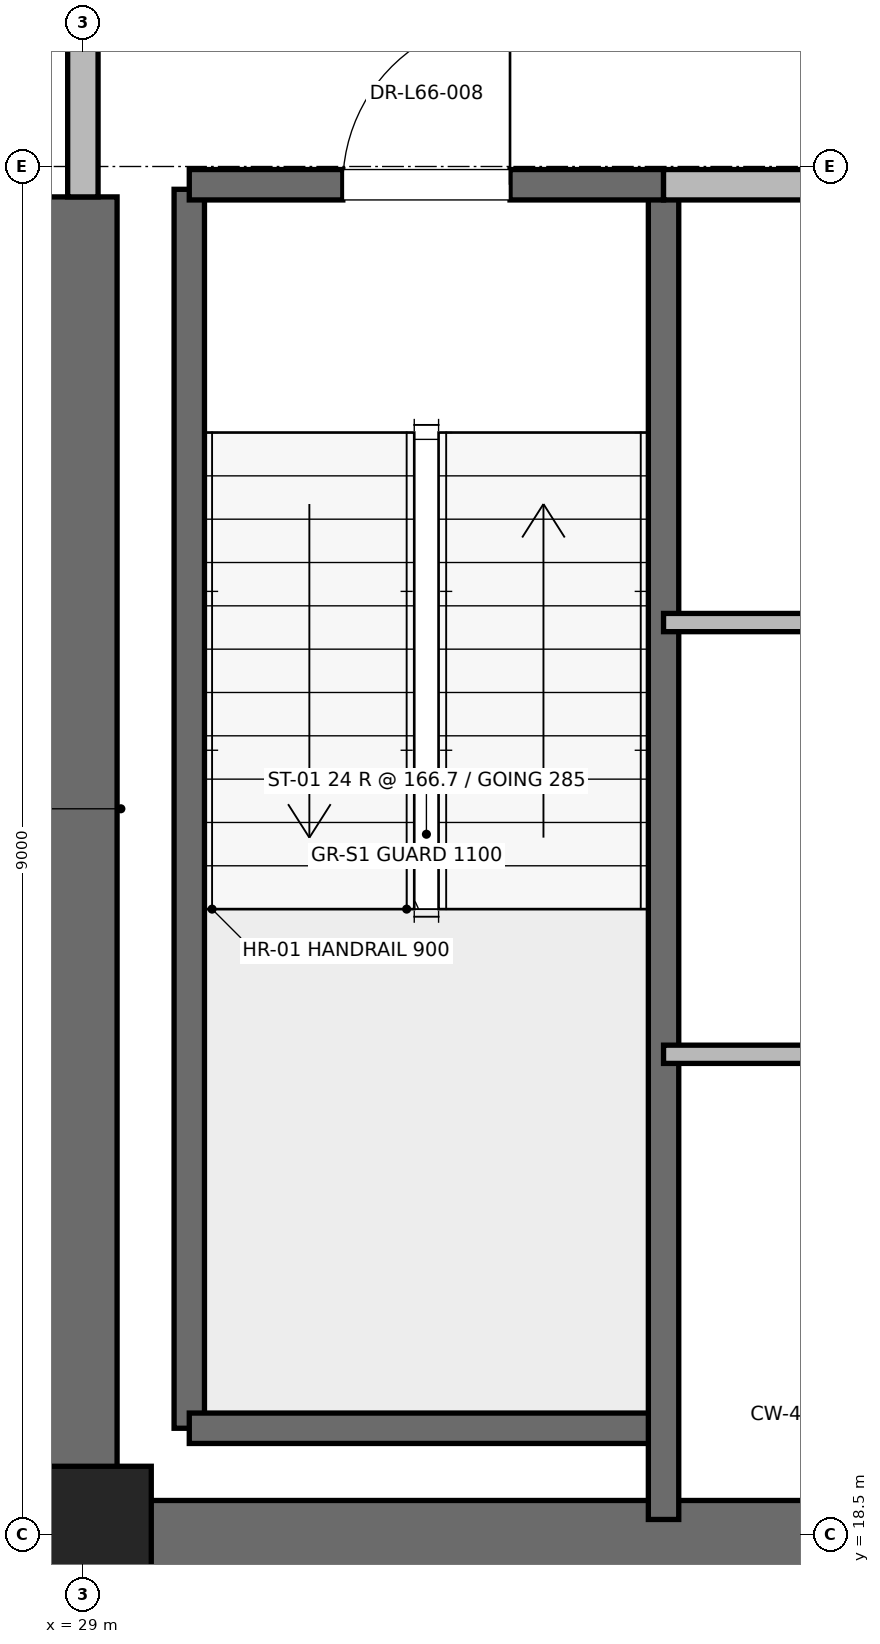
"""IFC4 building model, lengths in metres.
Left out: names, types, materials, properties, quantities, classifications, styles, units other than length and angle.
Written with IfcOpenShell. Run it as: python <this file> out.ifc"""

import sys

from ifc_helpers import new_model, si_unit, direction, frame, frame_2d, origin, origin_2d, place, context, subcontext, project, spatial, rectangle, extrude, element, fill, save


model = new_model("IFC4")
c1 = context("Model", 3, precision=1e-05, world=origin(), true_north=direction((0.0, 1.0)))
c2 = subcontext(c1, "Body", "Model", "MODEL_VIEW")
j1 = project(units=[si_unit("LENGTHUNIT", "METRE"), si_unit("PLANEANGLEUNIT", "RADIAN")], contexts=[c1])
p1 = place(None, origin())
s1 = spatial("IfcSite", under=j1, at=p1, CompositionType="ELEMENT")
p2 = place(p1, origin())
s2 = spatial("IfcBuilding", under=s1, at=p2, CompositionType="ELEMENT")
p3 = place(p2, frame((0.0, 0.0, 283.2)))
s3 = spatial("IfcBuildingStorey", under=s2, at=p3, CompositionType="ELEMENT", Elevation=283.2)
p4 = place(p3, frame((29.0, 18.5, 0.0), z_axis=(0.0, 0.0, 1.0), x_axis=(1.0, 0.0, 0.0)))
e1 = element("IfcColumn", 1, at=p4, inside=s3, PredefinedType="PILASTER", context=c2, shape_type="SweptSolid", body=[
    extrude(rectangle(XDim=0.9, YDim=0.9, at=origin_2d()), origin(), (0.0, 0.0, 1.0), 4.0),
])
p5 = place(p3, frame((29.0, 18.5, 0.0), z_axis=(0.0, 0.0, 1.0), x_axis=(1.0, 0.0, 0.0)))
e2 = element("IfcWall", 2, at=p5, inside=s3, PredefinedType="SHEAR", context=c2, shape_type="SweptSolid", body=[
    extrude(rectangle(XDim=9.2, YDim=0.45, at=frame_2d((4.6, 0.0))), origin(), (0.0, 0.0, 1.0), 3.785),
])
p6 = place(p3, frame((29.0, 18.5, 0.0), z_axis=(0.0, 0.0, 1.0), x_axis=(0.0, 1.0, 0.0)))
e3 = element("IfcWall", 3, at=p6, inside=s3, PredefinedType="SHEAR", context=c2, shape_type="SweptSolid", body=[
    extrude(rectangle(XDim=8.8, YDim=0.45, at=frame_2d((4.4, 0.0))), origin(), (0.0, 0.0, 1.0), 3.785),
])
p7 = place(p3, frame((29.7, 19.2, 0.0), z_axis=(0.0, 0.0, 1.0), x_axis=(0.0, 1.0, 0.0)))
e4 = element("IfcWall", 4, at=p7, inside=s3, PredefinedType="SOLIDWALL", context=c2, shape_type="SweptSolid", body=[
    extrude(rectangle(XDim=8.15, YDim=0.2, at=frame_2d((4.075, 0.0))), origin(), (0.0, 0.0, 1.0), 3.785),
])
p8 = place(p3, frame((29.7, 19.2, 0.0), z_axis=(0.0, 0.0, 1.0), x_axis=(1.0, 0.0, 0.0)))
e5 = element("IfcWall", 5, at=p8, inside=s3, PredefinedType="SOLIDWALL", context=c2, shape_type="SweptSolid", body=[
    extrude(rectangle(XDim=3.12, YDim=0.2, at=frame_2d((1.56, 0.0))), origin(), (0.0, 0.0, 1.0), 3.785),
])
p9 = place(p3, frame((32.82, 18.6, 0.0), z_axis=(0.0, 0.0, 1.0), x_axis=(0.0, 1.0, 0.0)))
e6 = element("IfcWall", 6, at=p9, inside=s3, PredefinedType="SOLIDWALL", context=c2, shape_type="SweptSolid", body=[
    extrude(rectangle(XDim=8.78, YDim=0.2, at=frame_2d((4.39, 0.0))), origin(), (0.0, 0.0, 1.0), 3.785),
])
p10 = place(p3, frame((29.7, 27.38, 0.0), z_axis=(0.0, 0.0, 1.0), x_axis=(1.0, 0.0, 0.0)))
e7 = element("IfcWall", 7, at=p10, inside=s3, PredefinedType="SOLIDWALL", context=c2, shape_type="SweptSolid", body=[
    extrude(rectangle(XDim=3.12, YDim=0.2, at=frame_2d((1.56, 0.0))), origin(), (0.0, 0.0, 1.0), 3.785),
])
p11 = place(p10, frame((1.01, 0.0, 0.0)))
e8 = element("IfcOpeningElement", 8, at=p11, cuts=e7, PredefinedType="OPENING", context=c2, shape_type="SweptSolid", body=[
    extrude(rectangle(XDim=1.1, YDim=2.15, at=frame_2d((0.55, 1.075))), frame((0.0, 0.1, 0.0), z_axis=(0.0, -1.0, 0.0), x_axis=(1.0, 0.0, 0.0)), (0.0, 0.0, 1.0), 0.2),
])
p12 = place(p3, frame((29.0, 27.3, 0.0), z_axis=(0.0, 0.0, 1.0), x_axis=(0.0, 1.0, 0.0)))
e9 = element("IfcWall", 9, at=p12, inside=s3, PredefinedType="PARTITIONING", context=c2, shape_type="SweptSolid", body=[
    extrude(rectangle(XDim=3.4, YDim=0.2, at=frame_2d((1.7, 0.0))), origin(), (0.0, 0.0, 1.0), 2.865),
])
p13 = place(p12, frame((1.125, 0.0, 0.0)))
e10 = element("IfcOpeningElement", 10, at=p13, cuts=e9, PredefinedType="OPENING", context=c2, shape_type="SweptSolid", body=[
    extrude(rectangle(XDim=1.15, YDim=2.2, at=frame_2d((0.575, 1.1))), frame((0.0, 0.1, 0.0), z_axis=(0.0, -1.0, 0.0), x_axis=(1.0, 0.0, 0.0)), (0.0, 0.0, 1.0), 0.2),
])
p14 = place(p3, frame((32.82, 27.38, 0.0), z_axis=(0.0, 0.0, 1.0), x_axis=(1.0, 0.0, 0.0)))
e11 = element("IfcWall", 11, at=p14, inside=s3, PredefinedType="PARTITIONING", context=c2, shape_type="SweptSolid", body=[
    extrude(rectangle(XDim=5.62, YDim=0.2, at=frame_2d((2.81, 0.0))), origin(), (0.0, 0.0, 1.0), 3.785),
])
for number, where, z_axis, x_axis in (
    (12, (32.82, 21.66, 0.0), (0.0, 0.0, 1.0), (1.0, 0.0, 0.0)),
    (13, (32.82, 24.5, 0.0), (0.0, 0.0, 1.0), (1.0, 0.0, 0.0)),
):
    element("IfcWall", number, at=place(p3, frame(where, z_axis=z_axis, x_axis=x_axis)), inside=s3, PredefinedType="PARTITIONING", context=c2, shape_type="SweptSolid", body=[
        extrude(rectangle(XDim=5.23, YDim=0.12, at=frame_2d((2.615, 0.0))), origin(), (0.0, 0.0, 1.0), 2.85),
    ])
p15 = place(p11, origin())
e14 = element("IfcDoor", 14, at=p15, inside=s3, OperationType="SINGLE_SWING_RIGHT", PredefinedType="DOOR", context=c2, shape_type="SweptSolid", body=[
    extrude(rectangle(XDim=1.1, YDim=2.15, at=frame_2d((0.55, 1.075))), frame((0.0, 0.025, 0.0), z_axis=(0.0, -1.0, 0.0), x_axis=(1.0, 0.0, 0.0)), (0.0, 0.0, 1.0), 0.05),
])
fill(e8, e14)
save(model, sys.argv[1])
